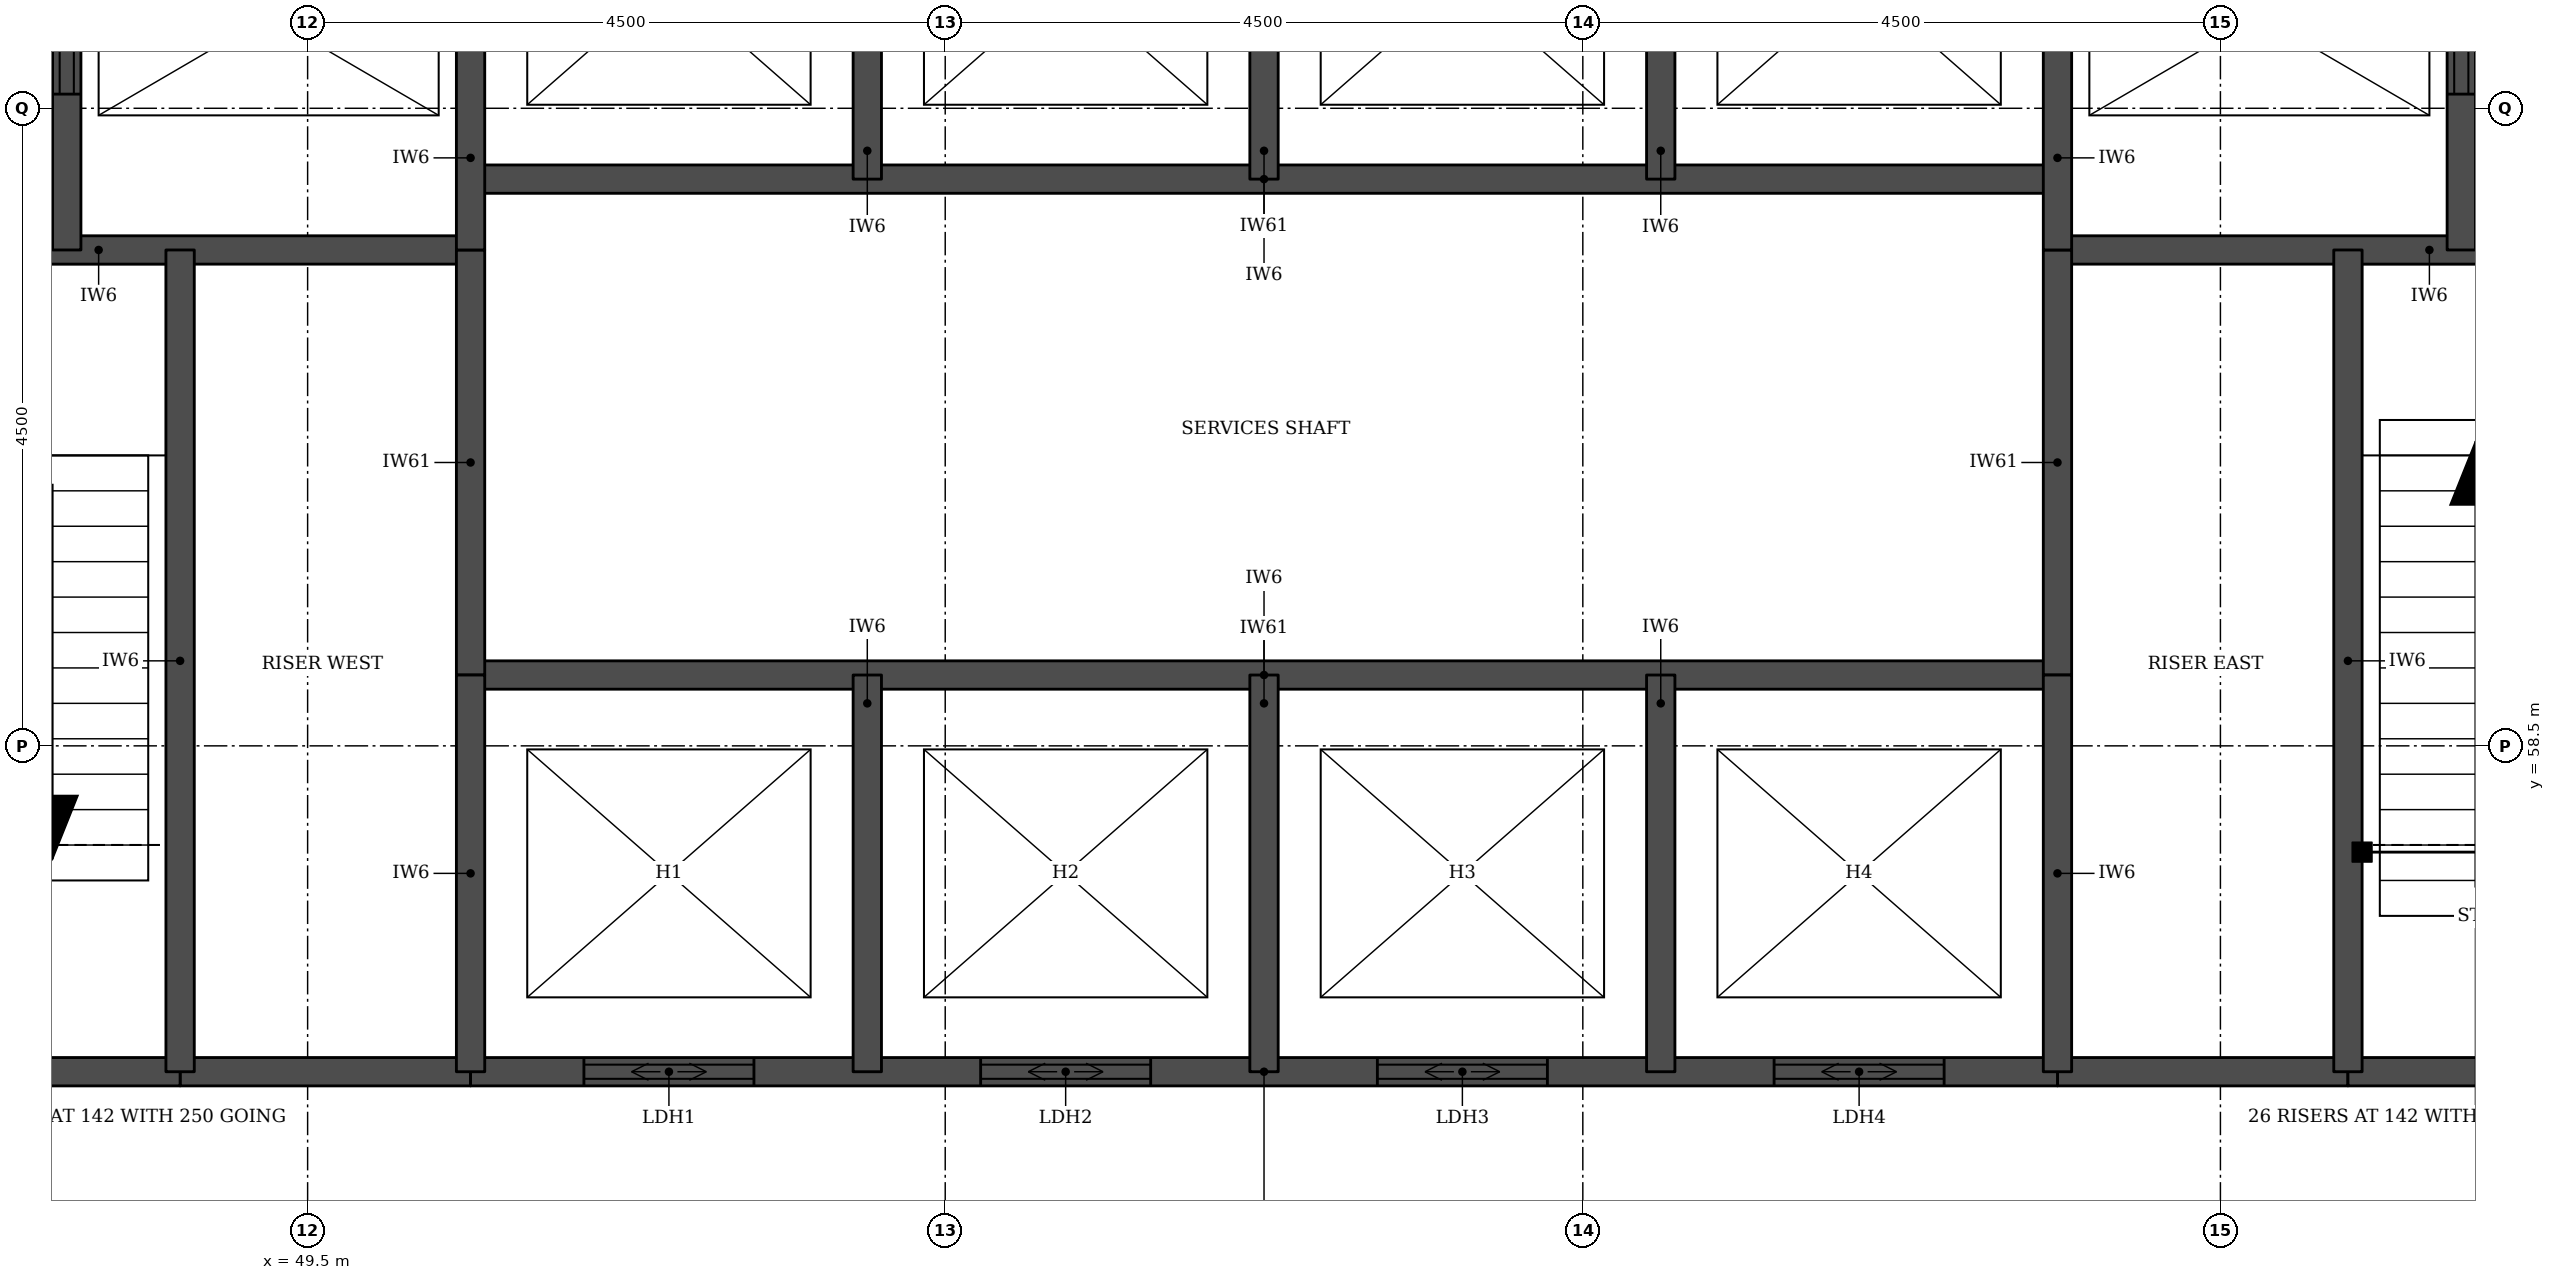
"""IFC4 building model, lengths in metres.
Left out: names, types, materials, properties, quantities, classifications, styles, units other than length and angle.
Written with IfcOpenShell. Run it as: python <this file> out.ifc"""

import sys

from ifc_helpers import new_model, si_unit, direction, frame, frame_2d, origin, place, context, subcontext, project, spatial, rectangle, extrude, element, fill, save


model = new_model("IFC4")
c1 = context("Model", 3, precision=1e-05, world=origin(), true_north=direction((0.0, 1.0)))
c2 = subcontext(c1, "Body", "Model", "MODEL_VIEW")
j1 = project(units=[si_unit("LENGTHUNIT", "METRE"), si_unit("PLANEANGLEUNIT", "RADIAN")], contexts=[c1])
p1 = place(None, origin())
s1 = spatial("IfcSite", under=j1, at=p1, CompositionType="ELEMENT")
p2 = place(p1, origin())
s2 = spatial("IfcBuilding", under=s1, at=p2, CompositionType="ELEMENT")
p3 = place(p2, frame((0.0, 0.0, 177.3)))
s3 = spatial("IfcBuildingStorey", under=s2, at=p3, CompositionType="ELEMENT", Elevation=177.3)
for number, where, z_axis, x_axis in (
    (1, (48.6, 56.2, 0.0), (0.0, 0.0, 1.0), (1.0, 0.0, 0.0)),
    (2, (61.85, 56.2, 0.0), (0.0, 0.0, 1.0), (1.0, 0.0, 0.0)),
):
    element("IfcWall", number, at=place(p3, frame(where, z_axis=z_axis, x_axis=x_axis)), inside=s3, PredefinedType="SOLIDWALL", context=c2, shape_type="SweptSolid", body=[
        extrude(rectangle(XDim=2.05, YDim=0.2, at=frame_2d((1.025, 0.0))), origin(), (0.0, 0.0, 1.0), 3.55),
    ])
p4 = place(p3, frame((45.4, 56.2, 0.0), z_axis=(0.0, 0.0, 1.0), x_axis=(1.0, 0.0, 0.0)))
e3 = element("IfcWall", 3, at=p4, inside=s3, PredefinedType="SOLIDWALL", context=c2, shape_type="SweptSolid", body=[
    extrude(rectangle(XDim=3.2, YDim=0.2, at=frame_2d((1.6, 0.0))), origin(), (0.0, 0.0, 1.0), 3.55),
])
p5 = place(p3, frame((50.65, 56.2, 0.0), z_axis=(0.0, 0.0, 1.0), x_axis=(1.0, 0.0, 0.0)))
e4 = element("IfcWall", 4, at=p5, inside=s3, PredefinedType="SOLIDWALL", context=c2, shape_type="SweptSolid", body=[
    extrude(rectangle(XDim=11.2, YDim=0.2, at=frame_2d((5.6, 0.0))), origin(), (0.0, 0.0, 1.0), 3.55),
])
p6 = place(p5, frame((0.8, 0.0, 0.0)))
e5 = element("IfcOpeningElement", 5, at=p6, cuts=e4, PredefinedType="OPENING", context=c2, shape_type="SweptSolid", body=[
    extrude(rectangle(XDim=1.2, YDim=2.1, at=frame_2d((0.6, 1.05))), frame((0.0, 0.11, 0.0), z_axis=(0.0, -1.0, 0.0), x_axis=(1.0, 0.0, 0.0)), (0.0, 0.0, 1.0), 0.22),
])
p7 = place(p5, frame((3.6, 0.0, 0.0)))
e6 = element("IfcOpeningElement", 6, at=p7, cuts=e4, PredefinedType="OPENING", context=c2, shape_type="SweptSolid", body=[
    extrude(rectangle(XDim=1.2, YDim=2.1, at=frame_2d((0.6, 1.05))), frame((0.0, 0.11, 0.0), z_axis=(0.0, -1.0, 0.0), x_axis=(1.0, 0.0, 0.0)), (0.0, 0.0, 1.0), 0.22),
])
p8 = place(p5, frame((6.4, 0.0, 0.0)))
e7 = element("IfcOpeningElement", 7, at=p8, cuts=e4, PredefinedType="OPENING", context=c2, shape_type="SweptSolid", body=[
    extrude(rectangle(XDim=1.2, YDim=2.1, at=frame_2d((0.6, 1.05))), frame((0.0, 0.11, 0.0), z_axis=(0.0, -1.0, 0.0), x_axis=(1.0, 0.0, 0.0)), (0.0, 0.0, 1.0), 0.22),
])
p9 = place(p5, frame((9.2, 0.0, 0.0)))
e8 = element("IfcOpeningElement", 8, at=p9, cuts=e4, PredefinedType="OPENING", context=c2, shape_type="SweptSolid", body=[
    extrude(rectangle(XDim=1.2, YDim=2.1, at=frame_2d((0.6, 1.05))), frame((0.0, 0.11, 0.0), z_axis=(0.0, -1.0, 0.0), x_axis=(1.0, 0.0, 0.0)), (0.0, 0.0, 1.0), 0.22),
])
p10 = place(p3, frame((63.9, 56.2, 0.0), z_axis=(0.0, 0.0, 1.0), x_axis=(1.0, 0.0, 0.0)))
e9 = element("IfcWall", 9, at=p10, inside=s3, PredefinedType="SOLIDWALL", context=c2, shape_type="SweptSolid", body=[
    extrude(rectangle(XDim=3.2, YDim=0.2, at=frame_2d((1.6, 0.0))), origin(), (0.0, 0.0, 1.0), 3.55),
])
p11 = place(p3, frame((50.65, 59.0, 0.0), z_axis=(0.0, 0.0, 1.0), x_axis=(1.0, 0.0, 0.0)))
e10 = element("IfcWall", 10, at=p11, inside=s3, PredefinedType="SOLIDWALL", context=c2, shape_type="SweptSolid", body=[
    extrude(rectangle(XDim=11.2, YDim=0.2, at=frame_2d((5.6, 0.0))), origin(), (0.0, 0.0, 1.0), 3.7),
])
for number, where, z_axis, x_axis in (
    (11, (45.4, 62.0, 0.0), (0.0, 0.0, 1.0), (1.0, 0.0, 0.0)),
    (12, (61.85, 62.0, 0.0), (0.0, 0.0, 1.0), (1.0, 0.0, 0.0)),
):
    element("IfcWall", number, at=place(p3, frame(where, z_axis=z_axis, x_axis=x_axis)), inside=s3, PredefinedType="SOLIDWALL", context=c2, shape_type="SweptSolid", body=[
        extrude(rectangle(XDim=5.25, YDim=0.2, at=frame_2d((2.625, 0.0))), origin(), (0.0, 0.0, 1.0), 3.55),
    ])
p12 = place(p3, frame((50.65, 62.5, 0.0), z_axis=(0.0, 0.0, 1.0), x_axis=(1.0, 0.0, 0.0)))
e13 = element("IfcWall", 13, at=p12, inside=s3, PredefinedType="SOLIDWALL", context=c2, shape_type="SweptSolid", body=[
    extrude(rectangle(XDim=11.2, YDim=0.2, at=frame_2d((5.6, 0.0))), origin(), (0.0, 0.0, 1.0), 3.7),
])
p13 = place(p3, frame((47.8, 62.0, 0.0), z_axis=(0.0, 0.0, 1.0), x_axis=(0.0, 1.0, 0.0)))
e14 = element("IfcWall", 14, at=p13, inside=s3, PredefinedType="SOLIDWALL", context=c2, shape_type="SweptSolid", body=[
    extrude(rectangle(XDim=3.3, YDim=0.2, at=frame_2d((1.65, 0.0))), origin(), (0.0, 0.0, 1.0), 3.55),
])
p14 = place(p13, frame((1.1, 0.0, 0.0)))
e15 = element("IfcOpeningElement", 15, at=p14, cuts=e14, PredefinedType="OPENING", context=c2, shape_type="SweptSolid", body=[
    extrude(rectangle(XDim=1.1, YDim=2.1, at=frame_2d((0.55, 1.05))), frame((0.0, 0.11, 0.0), z_axis=(0.0, -1.0, 0.0), x_axis=(1.0, 0.0, 0.0)), (0.0, 0.0, 1.0), 0.22),
])
p15 = place(p3, frame((48.6, 56.2, 0.0), z_axis=(0.0, 0.0, 1.0), x_axis=(0.0, 1.0, 0.0)))
e16 = element("IfcWall", 16, at=p15, inside=s3, PredefinedType="SOLIDWALL", context=c2, shape_type="SweptSolid", body=[
    extrude(rectangle(XDim=5.8, YDim=0.2, at=frame_2d((2.9, 0.0))), origin(), (0.0, 0.0, 1.0), 3.55),
])
p16 = place(p3, frame((50.65, 59.0, 0.0), z_axis=(0.0, 0.0, 1.0), x_axis=(0.0, 1.0, 0.0)))
e17 = element("IfcWall", 17, at=p16, inside=s3, PredefinedType="SOLIDWALL", context=c2, shape_type="SweptSolid", body=[
    extrude(rectangle(XDim=3.0, YDim=0.2, at=frame_2d((1.5, 0.0))), origin(), (0.0, 0.0, 1.0), 3.7),
])
p17 = place(p3, frame((50.65, 56.2, 0.0), z_axis=(0.0, 0.0, 1.0), x_axis=(0.0, 1.0, 0.0)))
e18 = element("IfcWall", 18, at=p17, inside=s3, PredefinedType="SOLIDWALL", context=c2, shape_type="SweptSolid", body=[
    extrude(rectangle(XDim=2.8, YDim=0.2, at=frame_2d((1.4, 0.0))), origin(), (0.0, 0.0, 1.0), 3.55),
])
p18 = place(p3, frame((50.65, 62.0, 0.0), z_axis=(0.0, 0.0, 1.0), x_axis=(0.0, 1.0, 0.0)))
e19 = element("IfcWall", 19, at=p18, inside=s3, PredefinedType="SOLIDWALL", context=c2, shape_type="SweptSolid", body=[
    extrude(rectangle(XDim=3.3, YDim=0.2, at=frame_2d((1.65, 0.0))), origin(), (0.0, 0.0, 1.0), 3.55),
])
for number, where, z_axis, x_axis in (
    (20, (53.45, 56.2, 0.0), (0.0, 0.0, 1.0), (0.0, 1.0, 0.0)),
    (21, (53.45, 62.5, 0.0), (0.0, 0.0, 1.0), (0.0, 1.0, 0.0)),
    (22, (56.25, 56.2, 0.0), (0.0, 0.0, 1.0), (0.0, 1.0, 0.0)),
    (23, (56.25, 62.5, 0.0), (0.0, 0.0, 1.0), (0.0, 1.0, 0.0)),
    (24, (59.05, 56.2, 0.0), (0.0, 0.0, 1.0), (0.0, 1.0, 0.0)),
    (25, (59.05, 62.5, 0.0), (0.0, 0.0, 1.0), (0.0, 1.0, 0.0)),
):
    element("IfcWall", number, at=place(p3, frame(where, z_axis=z_axis, x_axis=x_axis)), inside=s3, PredefinedType="SOLIDWALL", context=c2, shape_type="SweptSolid", body=[
        extrude(rectangle(XDim=2.8, YDim=0.2, at=frame_2d((1.4, 0.0))), origin(), (0.0, 0.0, 1.0), 3.55),
    ])
p19 = place(p3, frame((61.85, 59.0, 0.0), z_axis=(0.0, 0.0, 1.0), x_axis=(0.0, 1.0, 0.0)))
e26 = element("IfcWall", 26, at=p19, inside=s3, PredefinedType="SOLIDWALL", context=c2, shape_type="SweptSolid", body=[
    extrude(rectangle(XDim=3.0, YDim=0.2, at=frame_2d((1.5, 0.0))), origin(), (0.0, 0.0, 1.0), 3.7),
])
p20 = place(p3, frame((61.85, 56.2, 0.0), z_axis=(0.0, 0.0, 1.0), x_axis=(0.0, 1.0, 0.0)))
e27 = element("IfcWall", 27, at=p20, inside=s3, PredefinedType="SOLIDWALL", context=c2, shape_type="SweptSolid", body=[
    extrude(rectangle(XDim=2.8, YDim=0.2, at=frame_2d((1.4, 0.0))), origin(), (0.0, 0.0, 1.0), 3.55),
])
p21 = place(p3, frame((61.85, 62.0, 0.0), z_axis=(0.0, 0.0, 1.0), x_axis=(0.0, 1.0, 0.0)))
e28 = element("IfcWall", 28, at=p21, inside=s3, PredefinedType="SOLIDWALL", context=c2, shape_type="SweptSolid", body=[
    extrude(rectangle(XDim=3.3, YDim=0.2, at=frame_2d((1.65, 0.0))), origin(), (0.0, 0.0, 1.0), 3.55),
])
p22 = place(p3, frame((63.9, 56.2, 0.0), z_axis=(0.0, 0.0, 1.0), x_axis=(0.0, 1.0, 0.0)))
e29 = element("IfcWall", 29, at=p22, inside=s3, PredefinedType="SOLIDWALL", context=c2, shape_type="SweptSolid", body=[
    extrude(rectangle(XDim=5.8, YDim=0.2, at=frame_2d((2.9, 0.0))), origin(), (0.0, 0.0, 1.0), 3.55),
])
p23 = place(p3, frame((64.7, 62.0, 0.0), z_axis=(0.0, 0.0, 1.0), x_axis=(0.0, 1.0, 0.0)))
e30 = element("IfcWall", 30, at=p23, inside=s3, PredefinedType="SOLIDWALL", context=c2, shape_type="SweptSolid", body=[
    extrude(rectangle(XDim=3.3, YDim=0.2, at=frame_2d((1.65, 0.0))), origin(), (0.0, 0.0, 1.0), 3.55),
])
p24 = place(p23, frame((1.1, 0.0, 0.0)))
e31 = element("IfcOpeningElement", 31, at=p24, cuts=e30, PredefinedType="OPENING", context=c2, shape_type="SweptSolid", body=[
    extrude(rectangle(XDim=1.1, YDim=2.1, at=frame_2d((0.55, 1.05))), frame((0.0, 0.11, 0.0), z_axis=(0.0, -1.0, 0.0), x_axis=(1.0, 0.0, 0.0)), (0.0, 0.0, 1.0), 0.22),
])
p25 = place(p6, origin())
e32 = element("IfcDoor", 32, at=p25, inside=s3, OperationType="DOUBLE_DOOR_SLIDING", PredefinedType="DOOR", context=c2, shape_type="SweptSolid", body=[
    extrude(rectangle(XDim=1.2, YDim=2.1, at=frame_2d((0.6, 1.05))), frame((0.0, 0.025, 0.0), z_axis=(0.0, -1.0, 0.0), x_axis=(1.0, 0.0, 0.0)), (0.0, 0.0, 1.0), 0.05),
])
fill(e5, e32)
p26 = place(p7, origin())
e33 = element("IfcDoor", 33, at=p26, inside=s3, OperationType="DOUBLE_DOOR_SLIDING", PredefinedType="DOOR", context=c2, shape_type="SweptSolid", body=[
    extrude(rectangle(XDim=1.2, YDim=2.1, at=frame_2d((0.6, 1.05))), frame((0.0, 0.025, 0.0), z_axis=(0.0, -1.0, 0.0), x_axis=(1.0, 0.0, 0.0)), (0.0, 0.0, 1.0), 0.05),
])
fill(e6, e33)
p27 = place(p8, origin())
e34 = element("IfcDoor", 34, at=p27, inside=s3, OperationType="DOUBLE_DOOR_SLIDING", PredefinedType="DOOR", context=c2, shape_type="SweptSolid", body=[
    extrude(rectangle(XDim=1.2, YDim=2.1, at=frame_2d((0.6, 1.05))), frame((0.0, 0.025, 0.0), z_axis=(0.0, -1.0, 0.0), x_axis=(1.0, 0.0, 0.0)), (0.0, 0.0, 1.0), 0.05),
])
fill(e7, e34)
p28 = place(p9, origin())
e35 = element("IfcDoor", 35, at=p28, inside=s3, OperationType="DOUBLE_DOOR_SLIDING", PredefinedType="DOOR", context=c2, shape_type="SweptSolid", body=[
    extrude(rectangle(XDim=1.2, YDim=2.1, at=frame_2d((0.6, 1.05))), frame((0.0, 0.025, 0.0), z_axis=(0.0, -1.0, 0.0), x_axis=(1.0, 0.0, 0.0)), (0.0, 0.0, 1.0), 0.05),
])
fill(e8, e35)
p29 = place(p14, origin())
e36 = element("IfcDoor", 36, at=p29, inside=s3, OperationType="DOUBLE_DOOR_SLIDING", PredefinedType="DOOR", context=c2, shape_type="SweptSolid", body=[
    extrude(rectangle(XDim=1.1, YDim=2.1, at=frame_2d((0.55, 1.05))), frame((0.0, 0.025, 0.0), z_axis=(0.0, -1.0, 0.0), x_axis=(1.0, 0.0, 0.0)), (0.0, 0.0, 1.0), 0.05),
])
fill(e15, e36)
p30 = place(p24, origin())
e37 = element("IfcDoor", 37, at=p30, inside=s3, OperationType="DOUBLE_DOOR_SLIDING", PredefinedType="DOOR", context=c2, shape_type="SweptSolid", body=[
    extrude(rectangle(XDim=1.1, YDim=2.1, at=frame_2d((0.55, 1.05))), frame((0.0, 0.025, 0.0), z_axis=(0.0, -1.0, 0.0), x_axis=(1.0, 0.0, 0.0)), (0.0, 0.0, 1.0), 0.05),
])
fill(e31, e37)
save(model, sys.argv[1])
